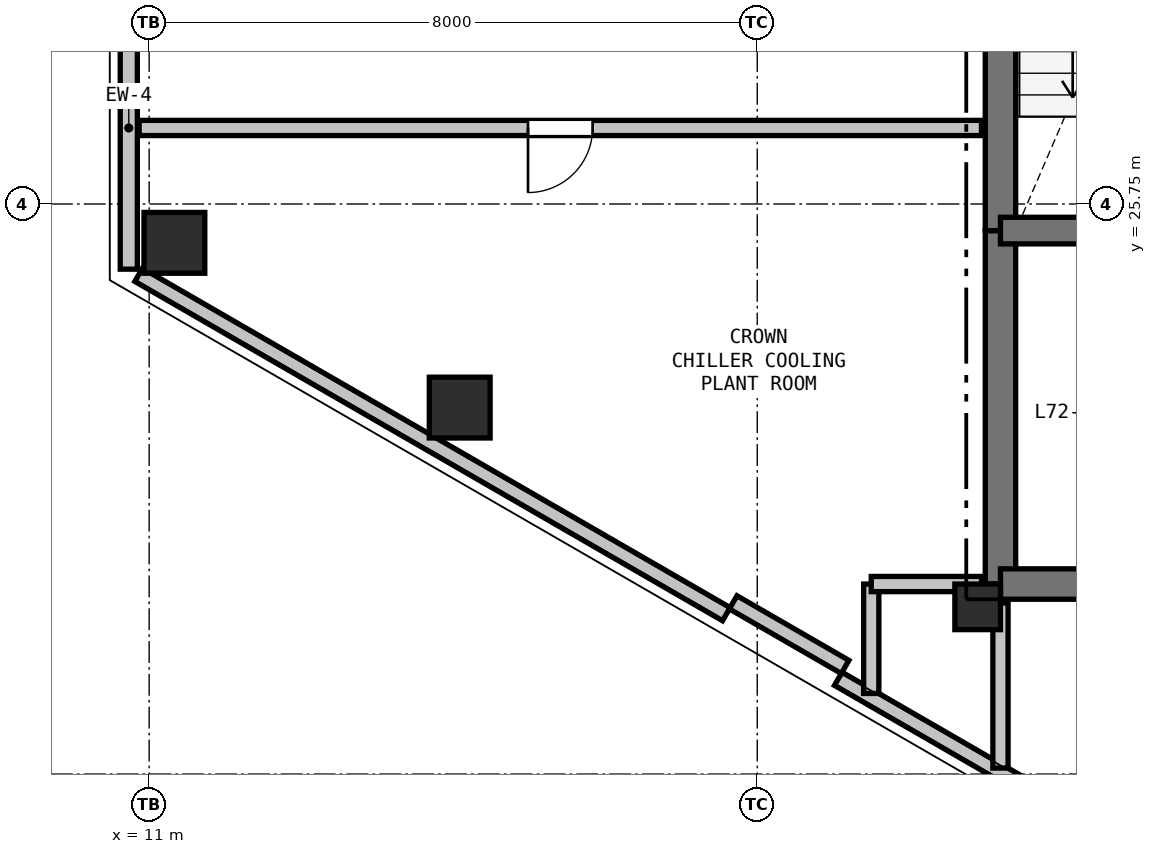
"""IFC4 building model, lengths in metres.
Left out: names, types, materials, properties, quantities, classifications, styles, units other than length and angle.
Written with IfcOpenShell. Run it as: python <this file> out.ifc"""

import sys

from ifc_helpers import new_model, si_unit, direction, frame, frame_2d, origin, origin_2d, place, context, subcontext, project, spatial, rectangle, hollow_rectangle, extrude, element, fill, save


model = new_model("IFC4")
c1 = context("Model", 3, precision=1e-05, world=origin(), true_north=direction((0.0, 1.0)))
c2 = subcontext(c1, "Body", "Model", "MODEL_VIEW")
j1 = project(units=[si_unit("LENGTHUNIT", "METRE"), si_unit("PLANEANGLEUNIT", "RADIAN")], contexts=[c1])
p1 = place(None, origin())
s1 = spatial("IfcSite", under=j1, at=p1, CompositionType="ELEMENT")
p2 = place(p1, origin())
s2 = spatial("IfcBuilding", under=s1, at=p2, CompositionType="ELEMENT")
p3 = place(p2, frame((0.0, 0.0, 258.6)))
s3 = spatial("IfcBuildingStorey", under=s2, at=p3, CompositionType="ELEMENT", Elevation=258.6)
p4 = place(p3, frame((21.9, 20.45, 0.0), z_axis=(0.0, 0.0, 1.0), x_axis=(1.0, 0.0, 0.0)))
e1 = element("IfcColumn", 1, at=p4, inside=s3, PredefinedType="COLUMN", context=c2, shape_type="SweptSolid", body=[
    extrude(rectangle(XDim=0.6, YDim=0.6, at=origin_2d()), origin(), (0.0, 0.0, 1.0), 5.4),
])
for number, where, z_axis, x_axis in (
    (2, (15.086, 23.072, 0.0), (0.0, 0.0, 1.0), (1.0, 0.0, 0.0)),
    (3, (11.332, 25.239, 0.0), (0.0, 0.0, 1.0), (1.0, 0.0, 0.0)),
):
    element("IfcColumn", number, at=place(p3, frame(where, z_axis=z_axis, x_axis=x_axis)), inside=s3, PredefinedType="COLUMN", context=c2, shape_type="SweptSolid", body=[
        extrude(hollow_rectangle(XDim=0.8, YDim=0.8, WallThickness=0.025, at=origin_2d()), origin(), (0.0, 0.0, 1.0), 5.4),
    ])
p5 = place(p3, frame((10.732, 24.892, 0.0), z_axis=(0.0, 0.0, 1.0), x_axis=(0.0, 1.0, 0.0)))
e4 = element("IfcWall", 4, at=p5, inside=s3, PredefinedType="SOLIDWALL", context=c2, shape_type="SweptSolid", body=[
    extrude(rectangle(XDim=3.715, YDim=0.225, at=frame_2d((1.858, 0.0))), origin(), (0.0, 0.0, 1.0), 4.7),
])
p6 = place(p3, frame((27.191, 15.389, 0.0), z_axis=(0.0, 0.0, 1.0), x_axis=(-0.866019557082, 0.500010126649, 0.0)))
e5 = element("IfcWall", 5, at=p6, inside=s3, PredefinedType="PARAPET", context=c2, shape_type="SweptSolid", body=[
    extrude(rectangle(XDim=8.228, YDim=0.2, at=frame_2d((4.114, 0.0))), origin(), (0.0, 0.0, 1.0), 0.2),
])
p7 = place(p3, frame((18.594, 20.354, 0.0), z_axis=(0.0, 0.0, 1.0), x_axis=(-0.866026655105, 0.499997832642, 0.0)))
e6 = element("IfcWall", 6, at=p7, inside=s3, PredefinedType="PARAPET", context=c2, shape_type="SweptSolid", body=[
    extrude(rectangle(XDim=8.928, YDim=0.2, at=frame_2d((4.464, 0.0))), origin(), (0.0, 0.0, 1.0), 0.2),
])
p8 = place(p3, frame((20.156, 19.659, 0.0), z_axis=(0.0, 0.0, 1.0), x_axis=(-0.866025371046, 0.500000056704, 0.0)))
e7 = element("IfcWall", 7, at=p8, inside=s3, PredefinedType="PARAPET", context=c2, shape_type="SweptSolid", body=[
    extrude(rectangle(XDim=1.7, YDim=0.2, at=frame_2d((0.85, 0.0))), origin(), (0.0, 0.0, 1.0), 4.7),
])
p9 = place(p3, frame((22.2, 20.75, 0.0), z_axis=(0.0, 0.0, 1.0), x_axis=(0.0, 1.0, 0.0)))
e8 = element("IfcWall", 8, at=p9, inside=s3, PredefinedType="SHEAR", context=c2, shape_type="SweptSolid", body=[
    extrude(rectangle(XDim=4.65, YDim=0.4, at=frame_2d((2.325, 0.0))), origin(), (0.0, 0.0, 1.0), 5.08),
])
p10 = place(p3, frame((22.2, 25.4, 0.0), z_axis=(0.0, 0.0, 1.0), x_axis=(0.0, 1.0, 0.0)))
e9 = element("IfcWall", 9, at=p10, inside=s3, PredefinedType="SHEAR", context=c2, shape_type="SweptSolid", body=[
    extrude(rectangle(XDim=7.35, YDim=0.4, at=frame_2d((3.675, 0.0))), origin(), (0.0, 0.0, 1.0), 5.08),
])
p11 = place(p3, frame((25.65, 20.75, 0.0), z_axis=(0.0, 0.0, 1.0), x_axis=(-1.0, 0.0, 0.0)))
e10 = element("IfcWall", 10, at=p11, inside=s3, PredefinedType="SHEAR", context=c2, shape_type="SweptSolid", body=[
    extrude(rectangle(XDim=3.45, YDim=0.4, at=frame_2d((1.725, 0.0))), origin(), (0.0, 0.0, 1.0), 5.08),
])
p12 = place(p11, frame((0.65, 0.0, 0.0)))
e11 = element("IfcOpeningElement", 11, at=p12, cuts=e10, PredefinedType="OPENING", context=c2, shape_type="SweptSolid", body=[
    extrude(rectangle(XDim=1.15, YDim=2.15, at=frame_2d((0.575, 1.075))), frame((0.0, 0.21, 0.0), z_axis=(0.0, -1.0, 0.0), x_axis=(1.0, 0.0, 0.0)), (0.0, 0.0, 1.0), 0.42),
])
p13 = place(p3, frame((22.2, 25.4, 0.0), z_axis=(0.0, 0.0, 1.0), x_axis=(1.0, 0.0, 0.0)))
e12 = element("IfcWall", 12, at=p13, inside=s3, PredefinedType="SHEAR", context=c2, shape_type="SweptSolid", body=[
    extrude(rectangle(XDim=3.45, YDim=0.35, at=frame_2d((1.725, 0.0))), origin(), (0.0, 0.0, 1.0), 5.08),
])
p14 = place(p13, frame((1.15, 0.0, 0.0)))
e13 = element("IfcOpeningElement", 13, at=p14, cuts=e12, PredefinedType="OPENING", context=c2, shape_type="SweptSolid", body=[
    extrude(rectangle(XDim=1.15, YDim=2.15, at=frame_2d((0.575, 1.075))), frame((0.0, 0.185, 0.0), z_axis=(0.0, -1.0, 0.0), x_axis=(1.0, 0.0, 0.0)), (0.0, 0.0, 1.0), 0.37),
])
p15 = place(p3, frame((22.2, 18.329, 0.0), z_axis=(0.0, 0.0, 1.0), x_axis=(0.0, 1.0, 0.0)))
e14 = element("IfcWall", 14, at=p15, inside=s3, PredefinedType="PARTITIONING", context=c2, shape_type="SweptSolid", body=[
    extrude(rectangle(XDim=2.171, YDim=0.2, at=frame_2d((1.085, 0.0))), origin(), (0.0, 0.0, 1.0), 4.528),
])
p16 = place(p3, frame((21.95, 26.75, 0.0), z_axis=(0.0, 0.0, 1.0), x_axis=(-1.0, 0.0, 0.0)))
e15 = element("IfcWall", 15, at=p16, inside=s3, PredefinedType="PARTITIONING", context=c2, shape_type="SweptSolid", body=[
    extrude(rectangle(XDim=11.082, YDim=0.2, at=frame_2d((5.541, 0.0))), origin(), (0.0, 0.0, 1.0), 4.605),
])
p17 = place(p16, frame((5.116, 0.0, 0.0)))
e16 = element("IfcOpeningElement", 16, at=p17, cuts=e15, PredefinedType="OPENING", context=c2, shape_type="SweptSolid", body=[
    extrude(rectangle(XDim=0.85, YDim=2.1, at=frame_2d((0.425, 1.05))), frame((0.0, 0.11, 0.0), z_axis=(0.0, -1.0, 0.0), x_axis=(1.0, 0.0, 0.0)), (0.0, 0.0, 1.0), 0.22),
])
p18 = place(p3, frame((20.5, 20.75, 0.0), z_axis=(0.0, 0.0, 1.0), x_axis=(0.0, -1.0, 0.0)))
e17 = element("IfcWall", 17, at=p18, inside=s3, PredefinedType="PARTITIONING", context=c2, shape_type="SweptSolid", body=[
    extrude(rectangle(XDim=1.439, YDim=0.2, at=frame_2d((0.72, 0.0))), origin(), (0.0, 0.0, 1.0), 4.805),
])
p19 = place(p3, frame((21.95, 20.75, 0.0), z_axis=(0.0, 0.0, 1.0), x_axis=(-1.0, 0.0, 0.0)))
e18 = element("IfcWall", 18, at=p19, inside=s3, PredefinedType="PARTITIONING", context=c2, shape_type="SweptSolid", body=[
    extrude(rectangle(XDim=1.45, YDim=0.2, at=frame_2d((0.725, 0.0))), origin(), (0.0, 0.0, 1.0), 4.528),
])
p20 = place(p17, origin())
e19 = element("IfcDoor", 19, at=p20, inside=s3, OperationType="SINGLE_SWING_RIGHT", PredefinedType="DOOR", context=c2, shape_type="SweptSolid", body=[
    extrude(rectangle(XDim=0.85, YDim=2.1, at=frame_2d((0.425, 1.05))), frame((0.0, 0.025, 0.0), z_axis=(0.0, -1.0, 0.0), x_axis=(1.0, 0.0, 0.0)), (0.0, 0.0, 1.0), 0.05),
])
fill(e16, e19)
save(model, sys.argv[1])
